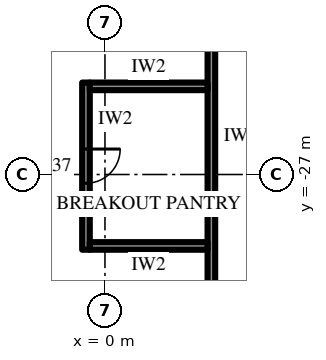
"""IFC4 building model, lengths in metres.
Left out: names, types, materials, properties, quantities, classifications, styles, units other than length and angle.
Written with IfcOpenShell. Run it as: python <this file> out.ifc"""

import sys

from ifc_helpers import new_model, si_unit, direction, frame, frame_2d, origin, place, context, subcontext, project, spatial, rectangle, extrude, element, fill, save


model = new_model("IFC4")
c1 = context("Model", 3, precision=1e-05, world=origin(), true_north=direction((0.0, 1.0)))
c2 = subcontext(c1, "Body", "Model", "MODEL_VIEW")
j1 = project(units=[si_unit("LENGTHUNIT", "METRE"), si_unit("PLANEANGLEUNIT", "RADIAN")], contexts=[c1])
p1 = place(None, origin())
s1 = spatial("IfcSite", under=j1, at=p1, CompositionType="ELEMENT")
p2 = place(p1, origin())
s2 = spatial("IfcBuilding", under=s1, at=p2, CompositionType="ELEMENT")
p3 = place(p2, frame((0.0, 0.0, 31.9)))
s3 = spatial("IfcBuildingStorey", under=s2, at=p3, CompositionType="ELEMENT", Elevation=31.9)
p4 = place(p3, frame((2.8, -18.2, 0.0), z_axis=(0.0, 0.0, 1.0), x_axis=(0.0, -1.0, 0.0)))
e1 = element("IfcWall", 1, at=p4, inside=s3, PredefinedType="PARTITIONING", context=c2, shape_type="SweptSolid", body=[
    extrude(rectangle(XDim=15.6, YDim=0.2, at=frame_2d((7.8, 0.0))), origin(), (0.0, 0.0, 1.0), 2.944),
])
p5 = place(p3, frame((-0.5, -24.58, 0.0), z_axis=(0.0, 0.0, 1.0), x_axis=(0.0, -1.0, 0.0)))
e2 = element("IfcWall", 2, at=p5, inside=s3, PredefinedType="PARTITIONING", context=c2, shape_type="SweptSolid", body=[
    extrude(rectangle(XDim=4.4, YDim=0.2, at=frame_2d((2.2, 0.0))), origin(), (0.0, 0.0, 1.0), 4.0),
])
p6 = place(p5, frame((1.75, 0.0, 0.0)))
e3 = element("IfcOpeningElement", 3, at=p6, cuts=e2, PredefinedType="OPENING", context=c2, shape_type="SweptSolid", body=[
    extrude(rectangle(XDim=0.9, YDim=2.2, at=frame_2d((0.45, 1.1))), frame((0.0, 0.11, 0.0), z_axis=(0.0, -1.0, 0.0), x_axis=(1.0, 0.0, 0.0)), (0.0, 0.0, 1.0), 0.22),
])
for number, where, z_axis, x_axis in (
    (4, (2.7, -24.68, 0.0), (0.0, 0.0, 1.0), (-1.0, 0.0, 0.0)),
    (5, (2.7, -28.88, 0.0), (0.0, 0.0, 1.0), (-1.0, 0.0, 0.0)),
):
    element("IfcWall", number, at=place(p3, frame(where, z_axis=z_axis, x_axis=x_axis)), inside=s3, PredefinedType="PARTITIONING", context=c2, shape_type="SweptSolid", body=[
        extrude(rectangle(XDim=3.1, YDim=0.2, at=frame_2d((1.55, 0.0))), origin(), (0.0, 0.0, 1.0), 4.0),
    ])
p7 = place(p6, origin())
e6 = element("IfcDoor", 6, at=p7, inside=s3, OperationType="SINGLE_SWING_RIGHT", PredefinedType="DOOR", context=c2, shape_type="SweptSolid", body=[
    extrude(rectangle(XDim=0.9, YDim=2.2, at=frame_2d((0.45, 1.1))), frame((0.0, 0.025, 0.0), z_axis=(0.0, -1.0, 0.0), x_axis=(1.0, 0.0, 0.0)), (0.0, 0.0, 1.0), 0.05),
])
fill(e3, e6)
save(model, sys.argv[1])
